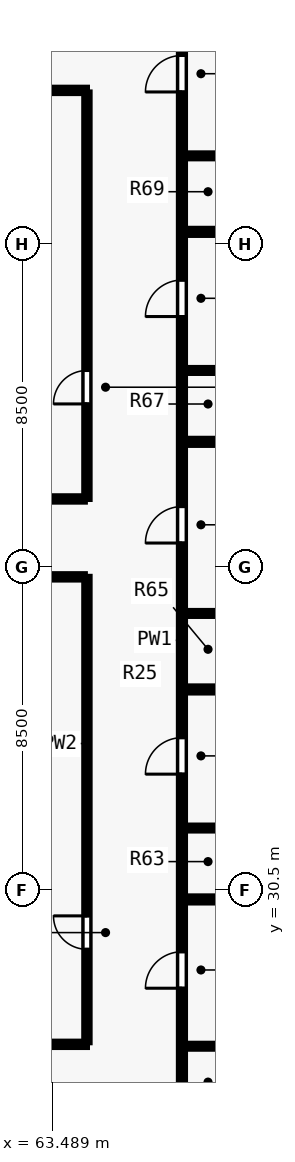
"""IFC4 building model, lengths in metres.
Left out: names, types, materials, properties, quantities, classifications, styles, units other than length and angle.
Written with IfcOpenShell. Run it as: python <this file> out.ifc"""

import sys

from ifc_helpers import new_model, si_unit, direction, frame, frame_2d, origin, place, context, subcontext, project, spatial, rectangle, extrude, element, fill, save


model = new_model("IFC4")
c1 = context("Model", 3, precision=1e-05, world=origin(), true_north=direction((0.0, 1.0)))
c2 = subcontext(c1, "Body", "Model", "MODEL_VIEW")
j1 = project(units=[si_unit("LENGTHUNIT", "METRE"), si_unit("PLANEANGLEUNIT", "RADIAN")], contexts=[c1])
p1 = place(None, origin())
s1 = spatial("IfcSite", under=j1, at=p1, CompositionType="ELEMENT")
p2 = place(p1, origin())
s2 = spatial("IfcBuilding", under=s1, at=p2, CompositionType="ELEMENT")
p3 = place(p2, frame((0.0, 0.0, 93.5)))
s3 = spatial("IfcBuildingStorey", under=s2, at=p3, CompositionType="ELEMENT", Elevation=93.5)
p4 = place(p3, frame((66.9, 24.015, 0.0), z_axis=(0.0, 0.0, 1.0), x_axis=(0.0, 1.0, 0.0)))
e1 = element("IfcWall", 1, at=p4, inside=s3, PredefinedType="PARTITIONING", context=c2, shape_type="SweptSolid", body=[
    extrude(rectangle(XDim=29.97, YDim=0.16, at=frame_2d((14.985, 0.0))), origin(), (0.0, 0.0, 1.0), 3.24),
])
p5 = place(p4, frame((3.911, 0.0, 0.0)))
e2 = element("IfcOpeningElement", 2, at=p5, cuts=e1, PredefinedType="OPENING", context=c2, shape_type="SweptSolid", body=[
    extrude(rectangle(XDim=0.96, YDim=2.15, at=frame_2d((0.48, 1.075))), frame((0.0, 0.09, 0.0), z_axis=(0.0, -1.0, 0.0), x_axis=(1.0, 0.0, 0.0)), (0.0, 0.0, 1.0), 0.18),
])
p6 = place(p4, frame((9.544, 0.0, 0.0)))
e3 = element("IfcOpeningElement", 3, at=p6, cuts=e1, PredefinedType="OPENING", context=c2, shape_type="SweptSolid", body=[
    extrude(rectangle(XDim=0.96, YDim=2.15, at=frame_2d((0.48, 1.075))), frame((0.0, 0.09, 0.0), z_axis=(0.0, -1.0, 0.0), x_axis=(1.0, 0.0, 0.0)), (0.0, 0.0, 1.0), 0.18),
])
p7 = place(p4, frame((15.625, 0.0, 0.0)))
e4 = element("IfcOpeningElement", 4, at=p7, cuts=e1, PredefinedType="OPENING", context=c2, shape_type="SweptSolid", body=[
    extrude(rectangle(XDim=0.96, YDim=2.15, at=frame_2d((0.48, 1.075))), frame((0.0, 0.09, 0.0), z_axis=(0.0, -1.0, 0.0), x_axis=(1.0, 0.0, 0.0)), (0.0, 0.0, 1.0), 0.18),
])
p8 = place(p4, frame((21.584, 0.0, 0.0)))
e5 = element("IfcOpeningElement", 5, at=p8, cuts=e1, PredefinedType="OPENING", context=c2, shape_type="SweptSolid", body=[
    extrude(rectangle(XDim=0.96, YDim=2.15, at=frame_2d((0.48, 1.075))), frame((0.0, 0.09, 0.0), z_axis=(0.0, -1.0, 0.0), x_axis=(1.0, 0.0, 0.0)), (0.0, 0.0, 1.0), 0.18),
])
p9 = place(p4, frame((27.494, 0.0, 0.0)))
e6 = element("IfcOpeningElement", 6, at=p9, cuts=e1, PredefinedType="OPENING", context=c2, shape_type="SweptSolid", body=[
    extrude(rectangle(XDim=0.96, YDim=2.15, at=frame_2d((0.48, 1.075))), frame((0.0, 0.09, 0.0), z_axis=(0.0, -1.0, 0.0), x_axis=(1.0, 0.0, 0.0)), (0.0, 0.0, 1.0), 0.18),
])
p10 = place(p3, frame((39.6, 26.45, 0.0), z_axis=(0.0, 0.0, 1.0), x_axis=(1.0, 0.0, 0.0)))
e7 = element("IfcWall", 7, at=p10, inside=s3, PredefinedType="PARTITIONING", context=c2, shape_type="SweptSolid", body=[
    extrude(rectangle(XDim=24.8, YDim=0.14, at=frame_2d((12.4, 0.0))), origin(), (0.0, 0.0, 1.0), 3.24),
])
p11 = place(p10, frame((1.2, 0.0, 0.0)))
e8 = element("IfcOpeningElement", 8, at=p11, cuts=e7, PredefinedType="OPENING", context=c2, shape_type="SweptSolid", body=[
    extrude(rectangle(XDim=0.88, YDim=2.1, at=frame_2d((0.44, 1.05))), frame((0.0, 0.08, 0.0), z_axis=(0.0, -1.0, 0.0), x_axis=(1.0, 0.0, 0.0)), (0.0, 0.0, 1.0), 0.16),
])
p12 = place(p10, frame((8.9, 0.0, 0.0)))
e9 = element("IfcOpeningElement", 9, at=p12, cuts=e7, PredefinedType="OPENING", context=c2, shape_type="SweptSolid", body=[
    extrude(rectangle(XDim=0.88, YDim=2.1, at=frame_2d((0.44, 1.05))), frame((0.0, 0.08, 0.0), z_axis=(0.0, -1.0, 0.0), x_axis=(1.0, 0.0, 0.0)), (0.0, 0.0, 1.0), 0.16),
])
p13 = place(p10, frame((19.4, 0.0, 0.0)))
e10 = element("IfcOpeningElement", 10, at=p13, cuts=e7, PredefinedType="OPENING", context=c2, shape_type="SweptSolid", body=[
    extrude(rectangle(XDim=0.88, YDim=2.1, at=frame_2d((0.44, 1.05))), frame((0.0, 0.08, 0.0), z_axis=(0.0, -1.0, 0.0), x_axis=(1.0, 0.0, 0.0)), (0.0, 0.0, 1.0), 0.16),
])
p14 = place(p3, frame((39.6, 51.55, 0.0), z_axis=(0.0, 0.0, 1.0), x_axis=(1.0, 0.0, 0.0)))
e11 = element("IfcWall", 11, at=p14, inside=s3, PredefinedType="PARTITIONING", context=c2, shape_type="SweptSolid", body=[
    extrude(rectangle(XDim=24.8, YDim=0.14, at=frame_2d((12.4, 0.0))), origin(), (0.0, 0.0, 1.0), 3.24),
])
p15 = place(p14, frame((2.2, 0.0, 0.0)))
e12 = element("IfcOpeningElement", 12, at=p15, cuts=e11, PredefinedType="OPENING", context=c2, shape_type="SweptSolid", body=[
    extrude(rectangle(XDim=0.88, YDim=2.1, at=frame_2d((0.44, 1.05))), frame((0.0, 0.08, 0.0), z_axis=(0.0, -1.0, 0.0), x_axis=(1.0, 0.0, 0.0)), (0.0, 0.0, 1.0), 0.16),
])
p16 = place(p14, frame((12.9, 0.0, 0.0)))
e13 = element("IfcOpeningElement", 13, at=p16, cuts=e11, PredefinedType="OPENING", context=c2, shape_type="SweptSolid", body=[
    extrude(rectangle(XDim=0.88, YDim=2.1, at=frame_2d((0.44, 1.05))), frame((0.0, 0.08, 0.0), z_axis=(0.0, -1.0, 0.0), x_axis=(1.0, 0.0, 0.0)), (0.0, 0.0, 1.0), 0.16),
])
p17 = place(p14, frame((22.4, 0.0, 0.0)))
e14 = element("IfcOpeningElement", 14, at=p17, cuts=e11, PredefinedType="OPENING", context=c2, shape_type="SweptSolid", body=[
    extrude(rectangle(XDim=0.88, YDim=2.1, at=frame_2d((0.44, 1.05))), frame((0.0, 0.08, 0.0), z_axis=(0.0, -1.0, 0.0), x_axis=(1.0, 0.0, 0.0)), (0.0, 0.0, 1.0), 0.16),
])
p18 = place(p3, frame((64.4, 26.505, 0.0), z_axis=(0.0, 0.0, 1.0), x_axis=(0.0, 1.0, 0.0)))
e15 = element("IfcWall", 15, at=p18, inside=s3, PredefinedType="PARTITIONING", context=c2, shape_type="SweptSolid", body=[
    extrude(rectangle(XDim=12.245, YDim=0.14, at=frame_2d((6.123, 0.0))), origin(), (0.0, 0.0, 1.0), 3.24),
])
p19 = place(p18, frame((2.445, 0.0, 0.0)))
e16 = element("IfcOpeningElement", 16, at=p19, cuts=e15, PredefinedType="OPENING", context=c2, shape_type="SweptSolid", body=[
    extrude(rectangle(XDim=0.88, YDim=2.1, at=frame_2d((0.44, 1.05))), frame((0.0, 0.08, 0.0), z_axis=(0.0, -1.0, 0.0), x_axis=(1.0, 0.0, 0.0)), (0.0, 0.0, 1.0), 0.16),
])
p20 = place(p3, frame((64.4, 40.8, 0.0), z_axis=(0.0, 0.0, 1.0), x_axis=(0.0, 1.0, 0.0)))
e17 = element("IfcWall", 17, at=p20, inside=s3, PredefinedType="PARTITIONING", context=c2, shape_type="SweptSolid", body=[
    extrude(rectangle(XDim=10.695, YDim=0.14, at=frame_2d((5.348, 0.0))), origin(), (0.0, 0.0, 1.0), 3.24),
])
p21 = place(p20, frame((2.5, 0.0, 0.0)))
e18 = element("IfcOpeningElement", 18, at=p21, cuts=e17, PredefinedType="OPENING", context=c2, shape_type="SweptSolid", body=[
    extrude(rectangle(XDim=0.88, YDim=2.1, at=frame_2d((0.44, 1.05))), frame((0.0, 0.08, 0.0), z_axis=(0.0, -1.0, 0.0), x_axis=(1.0, 0.0, 0.0)), (0.0, 0.0, 1.0), 0.16),
])
for number, where, z_axis, x_axis in (
    (19, (60.76, 38.75, 0.0), (0.0, 0.0, 1.0), (1.0, 0.0, 0.0)),
    (20, (60.76, 40.8, 0.0), (0.0, 0.0, 1.0), (1.0, 0.0, 0.0)),
):
    element("IfcWall", number, at=place(p3, frame(where, z_axis=z_axis, x_axis=x_axis)), inside=s3, PredefinedType="PARTITIONING", context=c2, shape_type="SweptSolid", body=[
        extrude(rectangle(XDim=3.585, YDim=0.14, at=frame_2d((1.792, 0.0))), origin(), (0.0, 0.0, 1.0), 3.24),
    ])
p22 = place(p3, frame((66.965, 26.4, 0.0), z_axis=(0.0, 0.0, 1.0), x_axis=(1.0, 0.0, 0.0)))
e21 = element("IfcWall", 21, at=p22, inside=s3, PredefinedType="PLUMBINGWALL", context=c2, shape_type="SweptSolid", body=[
    extrude(rectangle(XDim=2.235, YDim=0.13, at=frame_2d((1.117, 0.0))), origin(), (0.0, 0.0, 1.0), 3.24),
])
p23 = place(p3, frame((66.965, 30.262, 0.0), z_axis=(0.0, 0.0, 1.0), x_axis=(1.0, 0.0, 0.0)))
e22 = element("IfcWall", 22, at=p23, inside=s3, PredefinedType="PARTITIONING", context=c2, shape_type="SweptSolid", body=[
    extrude(rectangle(XDim=10.19, YDim=0.16, at=frame_2d((5.095, 0.0))), origin(), (0.0, 0.0, 1.0), 3.24),
])
p24 = place(p3, frame((66.965, 32.141, 0.0), z_axis=(0.0, 0.0, 1.0), x_axis=(1.0, 0.0, 0.0)))
e23 = element("IfcWall", 23, at=p24, inside=s3, PredefinedType="PLUMBINGWALL", context=c2, shape_type="SweptSolid", body=[
    extrude(rectangle(XDim=2.235, YDim=0.13, at=frame_2d((1.117, 0.0))), origin(), (0.0, 0.0, 1.0), 2.399),
])
p25 = place(p3, frame((66.965, 35.788, 0.0), z_axis=(0.0, 0.0, 1.0), x_axis=(1.0, 0.0, 0.0)))
e24 = element("IfcWall", 24, at=p25, inside=s3, PredefinedType="PARTITIONING", context=c2, shape_type="SweptSolid", body=[
    extrude(rectangle(XDim=10.19, YDim=0.16, at=frame_2d((5.095, 0.0))), origin(), (0.0, 0.0, 1.0), 3.24),
])
p26 = place(p3, frame((66.965, 37.788, 0.0), z_axis=(0.0, 0.0, 1.0), x_axis=(1.0, 0.0, 0.0)))
e25 = element("IfcWall", 25, at=p26, inside=s3, PredefinedType="PLUMBINGWALL", context=c2, shape_type="SweptSolid", body=[
    extrude(rectangle(XDim=2.235, YDim=0.13, at=frame_2d((1.117, 0.0))), origin(), (0.0, 0.0, 1.0), 3.24),
])
p27 = place(p3, frame((66.965, 42.302, 0.0), z_axis=(0.0, 0.0, 1.0), x_axis=(1.0, 0.0, 0.0)))
e26 = element("IfcWall", 26, at=p27, inside=s3, PredefinedType="PARTITIONING", context=c2, shape_type="SweptSolid", body=[
    extrude(rectangle(XDim=10.19, YDim=0.16, at=frame_2d((5.095, 0.0))), origin(), (0.0, 0.0, 1.0), 3.24),
])
p28 = place(p3, frame((66.965, 44.181, 0.0), z_axis=(0.0, 0.0, 1.0), x_axis=(1.0, 0.0, 0.0)))
e27 = element("IfcWall", 27, at=p28, inside=s3, PredefinedType="PLUMBINGWALL", context=c2, shape_type="SweptSolid", body=[
    extrude(rectangle(XDim=2.235, YDim=0.13, at=frame_2d((1.117, 0.0))), origin(), (0.0, 0.0, 1.0), 3.24),
])
p29 = place(p3, frame((66.965, 47.827, 0.0), z_axis=(0.0, 0.0, 1.0), x_axis=(1.0, 0.0, 0.0)))
e28 = element("IfcWall", 28, at=p29, inside=s3, PredefinedType="PARTITIONING", context=c2, shape_type="SweptSolid", body=[
    extrude(rectangle(XDim=10.19, YDim=0.16, at=frame_2d((5.095, 0.0))), origin(), (0.0, 0.0, 1.0), 3.24),
])
p30 = place(p3, frame((66.965, 49.827, 0.0), z_axis=(0.0, 0.0, 1.0), x_axis=(1.0, 0.0, 0.0)))
e29 = element("IfcWall", 29, at=p30, inside=s3, PredefinedType="PLUMBINGWALL", context=c2, shape_type="SweptSolid", body=[
    extrude(rectangle(XDim=2.235, YDim=0.13, at=frame_2d((1.117, 0.0))), origin(), (0.0, 0.0, 1.0), 3.24),
])
p31 = place(p19, origin())
e30 = element("IfcDoor", 30, at=p31, inside=s3, OperationType="SINGLE_SWING_RIGHT", PredefinedType="DOOR", context=c2, shape_type="SweptSolid", body=[
    extrude(rectangle(XDim=0.88, YDim=2.1, at=frame_2d((0.44, 1.05))), frame((0.0, 0.025, 0.0), z_axis=(0.0, -1.0, 0.0), x_axis=(1.0, 0.0, 0.0)), (0.0, 0.0, 1.0), 0.05),
])
fill(e16, e30)
p32 = place(p21, origin())
e31 = element("IfcDoor", 31, at=p32, inside=s3, OperationType="SINGLE_SWING_LEFT", PredefinedType="DOOR", context=c2, shape_type="SweptSolid", body=[
    extrude(rectangle(XDim=0.88, YDim=2.1, at=frame_2d((0.44, 1.05))), frame((0.0, 0.025, 0.0), z_axis=(0.0, -1.0, 0.0), x_axis=(1.0, 0.0, 0.0)), (0.0, 0.0, 1.0), 0.05),
])
fill(e18, e31)
p33 = place(p5, origin())
e32 = element("IfcDoor", 32, at=p33, inside=s3, OperationType="SINGLE_SWING_LEFT", PredefinedType="DOOR", context=c2, shape_type="SweptSolid", body=[
    extrude(rectangle(XDim=0.96, YDim=2.15, at=frame_2d((0.48, 1.075))), frame((0.0, 0.025, 0.0), z_axis=(0.0, -1.0, 0.0), x_axis=(1.0, 0.0, 0.0)), (0.0, 0.0, 1.0), 0.05),
])
fill(e2, e32)
p34 = place(p6, origin())
e33 = element("IfcDoor", 33, at=p34, inside=s3, OperationType="SINGLE_SWING_LEFT", PredefinedType="DOOR", context=c2, shape_type="SweptSolid", body=[
    extrude(rectangle(XDim=0.96, YDim=2.15, at=frame_2d((0.48, 1.075))), frame((0.0, 0.025, 0.0), z_axis=(0.0, -1.0, 0.0), x_axis=(1.0, 0.0, 0.0)), (0.0, 0.0, 1.0), 0.05),
])
fill(e3, e33)
p35 = place(p7, origin())
e34 = element("IfcDoor", 34, at=p35, inside=s3, OperationType="SINGLE_SWING_LEFT", PredefinedType="DOOR", context=c2, shape_type="SweptSolid", body=[
    extrude(rectangle(XDim=0.96, YDim=2.15, at=frame_2d((0.48, 1.075))), frame((0.0, 0.025, 0.0), z_axis=(0.0, -1.0, 0.0), x_axis=(1.0, 0.0, 0.0)), (0.0, 0.0, 1.0), 0.05),
])
fill(e4, e34)
p36 = place(p8, origin())
e35 = element("IfcDoor", 35, at=p36, inside=s3, OperationType="SINGLE_SWING_LEFT", PredefinedType="DOOR", context=c2, shape_type="SweptSolid", body=[
    extrude(rectangle(XDim=0.96, YDim=2.15, at=frame_2d((0.48, 1.075))), frame((0.0, 0.025, 0.0), z_axis=(0.0, -1.0, 0.0), x_axis=(1.0, 0.0, 0.0)), (0.0, 0.0, 1.0), 0.05),
])
fill(e5, e35)
p37 = place(p9, origin())
e36 = element("IfcDoor", 36, at=p37, inside=s3, OperationType="SINGLE_SWING_LEFT", PredefinedType="DOOR", context=c2, shape_type="SweptSolid", body=[
    extrude(rectangle(XDim=0.96, YDim=2.15, at=frame_2d((0.48, 1.075))), frame((0.0, 0.025, 0.0), z_axis=(0.0, -1.0, 0.0), x_axis=(1.0, 0.0, 0.0)), (0.0, 0.0, 1.0), 0.05),
])
fill(e6, e36)
save(model, sys.argv[1])
